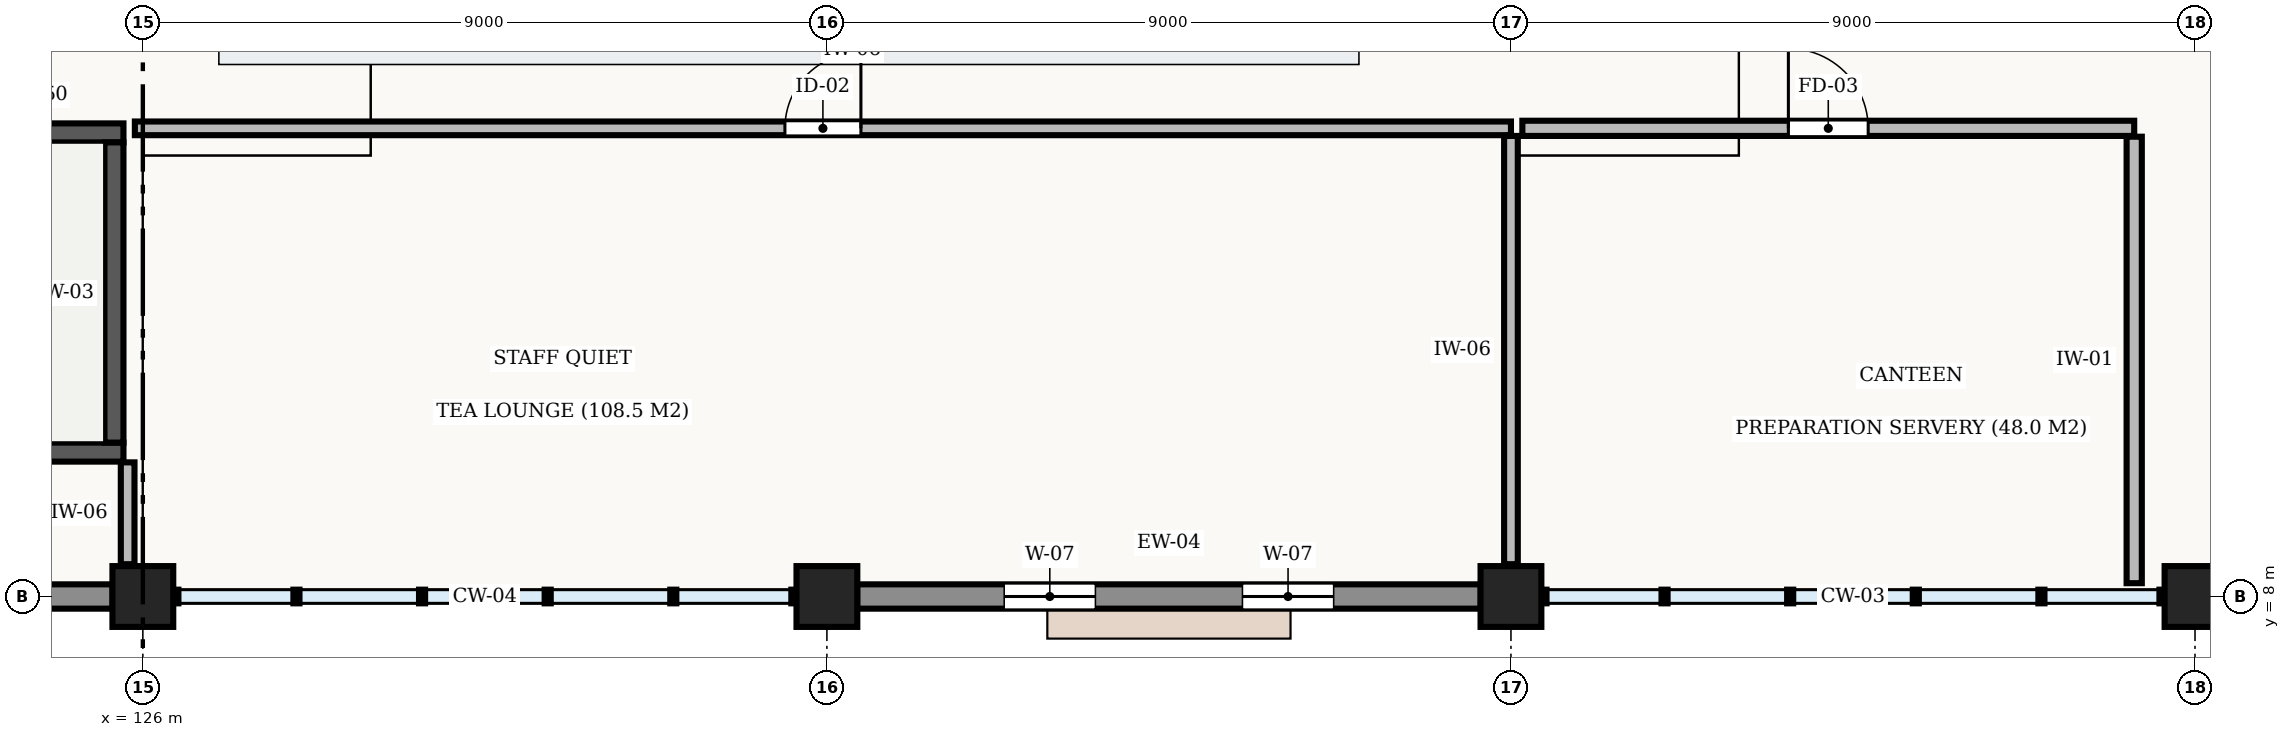
"""IFC4 building model, lengths in metres.
Left out: names, types, materials, properties, quantities, classifications, styles, units other than length and angle.
Written with IfcOpenShell. Run it as: python <this file> out.ifc"""

import sys

from ifc_helpers import new_model, si_unit, direction, frame, frame_2d, origin, origin_2d, place, context, subcontext, project, spatial, rectangle, extrude, element, fill, save


model = new_model("IFC4")
c1 = context("Model", 3, precision=1e-05, world=origin(), true_north=direction((0.0, 1.0)))
c2 = subcontext(c1, "Body", "Model", "MODEL_VIEW")
j1 = project(units=[si_unit("LENGTHUNIT", "METRE"), si_unit("PLANEANGLEUNIT", "RADIAN")], contexts=[c1])
p1 = place(None, origin())
s1 = spatial("IfcSite", under=j1, at=p1, CompositionType="ELEMENT")
p2 = place(p1, origin())
s2 = spatial("IfcBuilding", under=s1, at=p2, CompositionType="ELEMENT")
p3 = place(p2, frame((0.0, 0.0, 5.4)))
s3 = spatial("IfcBuildingStorey", under=s2, at=p3, CompositionType="ELEMENT", Elevation=5.4)
for number, where, z_axis, x_axis in (
    (1, (126.0, 8.0, 0.0), (0.0, 0.0, 1.0), (1.0, 0.0, 0.0)),
    (2, (135.0, 8.0, 0.0), (0.0, 0.0, 1.0), (1.0, 0.0, 0.0)),
    (3, (144.0, 8.0, 0.0), (0.0, 0.0, 1.0), (1.0, 0.0, 0.0)),
    (4, (153.0, 8.0, 0.0), (0.0, 0.0, 1.0), (1.0, 0.0, 0.0)),
):
    element("IfcColumn", number, at=place(p3, frame(where, z_axis=z_axis, x_axis=x_axis)), inside=s3, PredefinedType="COLUMN", context=c2, shape_type="SweptSolid", body=[
        extrude(rectangle(XDim=0.8, YDim=0.8, at=origin_2d()), origin(), (0.0, 0.0, 1.0), 4.8),
    ])
p4 = place(p3, frame((143.602, 8.0, 0.0), z_axis=(0.0, 0.0, 1.0), x_axis=(-1.0, 0.0, 0.0)))
e5 = element("IfcWall", 5, at=p4, inside=s3, PredefinedType="STANDARD", context=c2, shape_type="SweptSolid", body=[
    extrude(rectangle(XDim=8.204, YDim=0.32, at=frame_2d((4.102, 0.0))), origin(), (0.0, 0.0, 1.0), 3.86),
])
p5 = place(p4, frame((1.935, 0.0, 0.7)))
e6 = element("IfcOpeningElement", 6, at=p5, cuts=e5, PredefinedType="OPENING", context=c2, shape_type="SweptSolid", body=[
    extrude(rectangle(XDim=1.2, YDim=1.8, at=frame_2d((0.6, 0.9))), frame((0.0, 0.172, 0.0), z_axis=(0.0, -1.0, 0.0), x_axis=(1.0, 0.0, 0.0)), (0.0, 0.0, 1.0), 0.344),
])
p6 = place(p4, frame((5.069, 0.0, 0.7)))
e7 = element("IfcOpeningElement", 7, at=p6, cuts=e5, PredefinedType="OPENING", context=c2, shape_type="SweptSolid", body=[
    extrude(rectangle(XDim=1.2, YDim=1.8, at=frame_2d((0.6, 0.9))), frame((0.0, 0.172, 0.0), z_axis=(0.0, -1.0, 0.0), x_axis=(1.0, 0.0, 0.0)), (0.0, 0.0, 1.0), 0.344),
])
p7 = place(p3, frame((125.602, 8.0, 0.0), z_axis=(0.0, 0.0, 1.0), x_axis=(-1.0, 0.0, 0.0)))
e8 = element("IfcWall", 8, at=p7, inside=s3, PredefinedType="STANDARD", context=c2, shape_type="SweptSolid", body=[
    extrude(rectangle(XDim=8.204, YDim=0.32, at=frame_2d((4.102, 0.0))), origin(), (0.0, 0.0, 1.0), 3.86),
])
p8 = place(p7, frame((1.835, 0.0, 0.9)))
e9 = element("IfcOpeningElement", 9, at=p8, cuts=e8, PredefinedType="OPENING", context=c2, shape_type="SweptSolid", body=[
    extrude(rectangle(XDim=1.35, YDim=2.0, at=frame_2d((0.675, 1.0))), frame((0.0, 0.172, 0.0), z_axis=(0.0, -1.0, 0.0), x_axis=(1.0, 0.0, 0.0)), (0.0, 0.0, 1.0), 0.344),
])
p9 = place(p7, frame((5.019, 0.0, 0.9)))
e10 = element("IfcOpeningElement", 10, at=p9, cuts=e8, PredefinedType="OPENING", context=c2, shape_type="SweptSolid", body=[
    extrude(rectangle(XDim=1.35, YDim=2.0, at=frame_2d((0.675, 1.0))), frame((0.0, 0.172, 0.0), z_axis=(0.0, -1.0, 0.0), x_axis=(1.0, 0.0, 0.0)), (0.0, 0.0, 1.0), 0.344),
])
p10 = place(p3, frame((117.255, 9.9, 0.0), z_axis=(0.0, 0.0, 1.0), x_axis=(1.0, 0.0, 0.0)))
e11 = element("IfcWall", 11, at=p10, inside=s3, PredefinedType="SHEAR", context=c2, shape_type="SweptSolid", body=[
    extrude(rectangle(XDim=8.49, YDim=0.25, at=frame_2d((4.245, 0.0))), origin(), (0.0, 0.0, 1.0), 4.48),
])
p11 = place(p3, frame((125.745, 14.1, 0.0), z_axis=(0.0, 0.0, 1.0), x_axis=(-1.0, 0.0, 0.0)))
e12 = element("IfcWall", 12, at=p11, inside=s3, PredefinedType="SHEAR", context=c2, shape_type="SweptSolid", body=[
    extrude(rectangle(XDim=8.49, YDim=0.25, at=frame_2d((4.245, 0.0))), origin(), (0.0, 0.0, 1.0), 4.48),
])
p12 = place(p11, frame((6.835, 0.0, 0.0)))
e13 = element("IfcOpeningElement", 13, at=p12, cuts=e12, PredefinedType="OPENING", context=c2, shape_type="SweptSolid", body=[
    extrude(rectangle(XDim=1.25, YDim=2.15, at=frame_2d((0.625, 1.075))), frame((0.0, 0.137, 0.0), z_axis=(0.0, -1.0, 0.0), x_axis=(1.0, 0.0, 0.0)), (0.0, 0.0, 1.0), 0.274),
])
p13 = place(p3, frame((125.62, 10.025, 0.0), z_axis=(0.0, 0.0, 1.0), x_axis=(0.0, 1.0, 0.0)))
e14 = element("IfcWall", 14, at=p13, inside=s3, PredefinedType="SHEAR", context=c2, shape_type="SweptSolid", body=[
    extrude(rectangle(XDim=3.95, YDim=0.25, at=frame_2d((1.975, 0.0))), origin(), (0.0, 0.0, 1.0), 4.48),
])
p14 = place(p3, frame((125.895, 14.16, 0.0), z_axis=(0.0, 0.0, 1.0), x_axis=(1.0, 0.0, 0.0)))
e15 = element("IfcWall", 15, at=p14, inside=s3, PredefinedType="STANDARD", context=c2, shape_type="SweptSolid", body=[
    extrude(rectangle(XDim=18.105, YDim=0.18, at=frame_2d((9.052, 0.0))), origin(), (0.0, 0.0, 1.0), 4.48),
])
p15 = place(p14, frame((8.552, 0.0, 0.0)))
e16 = element("IfcOpeningElement", 16, at=p15, cuts=e15, PredefinedType="OPENING", context=c2, shape_type="SweptSolid", body=[
    extrude(rectangle(XDim=1.0, YDim=2.1, at=frame_2d((0.5, 1.05))), frame((0.0, 0.102, 0.0), z_axis=(0.0, -1.0, 0.0), x_axis=(1.0, 0.0, 0.0)), (0.0, 0.0, 1.0), 0.204),
])
p16 = place(p3, frame((125.8, 8.425, 0.0), z_axis=(0.0, 0.0, 1.0), x_axis=(0.0, 1.0, 0.0)))
e17 = element("IfcWall", 17, at=p16, inside=s3, PredefinedType="STANDARD", context=c2, shape_type="SweptSolid", body=[
    extrude(rectangle(XDim=1.34, YDim=0.18, at=frame_2d((0.67, 0.0))), origin(), (0.0, 0.0, 1.0), 3.86),
])
p17 = place(p3, frame((144.0, 8.425, 0.0), z_axis=(0.0, 0.0, 1.0), x_axis=(0.0, 1.0, 0.0)))
e18 = element("IfcWall", 18, at=p17, inside=s3, PredefinedType="STANDARD", context=c2, shape_type="SweptSolid", body=[
    extrude(rectangle(XDim=5.635, YDim=0.18, at=frame_2d((2.817, 0.0))), origin(), (0.0, 0.0, 1.0), 3.86),
])
p18 = place(p3, frame((144.15, 14.16, 0.0), z_axis=(0.0, 0.0, 1.0), x_axis=(1.0, 0.0, 0.0)))
e19 = element("IfcWall", 19, at=p18, inside=s3, PredefinedType="STANDARD", context=c2, shape_type="SweptSolid", body=[
    extrude(rectangle(XDim=8.05, YDim=0.2, at=frame_2d((4.025, 0.0))), origin(), (0.0, 0.0, 1.0), 4.48),
])
p19 = place(p18, frame((3.5, 0.0, 0.0)))
e20 = element("IfcOpeningElement", 20, at=p19, cuts=e19, PredefinedType="OPENING", context=c2, shape_type="SweptSolid", body=[
    extrude(rectangle(XDim=1.05, YDim=2.15, at=frame_2d((0.525, 1.075))), frame((0.0, 0.112, 0.0), z_axis=(0.0, -1.0, 0.0), x_axis=(1.0, 0.0, 0.0)), (0.0, 0.0, 1.0), 0.224),
])
p20 = place(p3, frame((152.2, 8.175, 0.0), z_axis=(0.0, 0.0, 1.0), x_axis=(0.0, 1.0, 0.0)))
e21 = element("IfcWall", 21, at=p20, inside=s3, PredefinedType="STANDARD", context=c2, shape_type="SweptSolid", body=[
    extrude(rectangle(XDim=5.875, YDim=0.2, at=frame_2d((2.938, 0.0))), origin(), (0.0, 0.0, 1.0), 4.48),
])
p21 = place(p5, origin())
e22 = element("IfcWindow", 22, at=p21, inside=s3, PartitioningType="SINGLE_PANEL", PredefinedType="WINDOW", context=c2, shape_type="SweptSolid", body=[
    extrude(rectangle(XDim=1.2, YDim=1.8, at=frame_2d((0.6, 0.9))), frame((0.0, 0.03, 0.0), z_axis=(0.0, -1.0, 0.0), x_axis=(1.0, 0.0, 0.0)), (0.0, 0.0, 1.0), 0.06),
])
fill(e6, e22)
p22 = place(p6, origin())
e23 = element("IfcWindow", 23, at=p22, inside=s3, PartitioningType="SINGLE_PANEL", PredefinedType="WINDOW", context=c2, shape_type="SweptSolid", body=[
    extrude(rectangle(XDim=1.2, YDim=1.8, at=frame_2d((0.6, 0.9))), frame((0.0, 0.03, 0.0), z_axis=(0.0, -1.0, 0.0), x_axis=(1.0, 0.0, 0.0)), (0.0, 0.0, 1.0), 0.06),
])
fill(e7, e23)
p23 = place(p15, origin())
e24 = element("IfcDoor", 24, at=p23, inside=s3, OperationType="SINGLE_SWING_RIGHT", PredefinedType="DOOR", context=c2, shape_type="SweptSolid", body=[
    extrude(rectangle(XDim=1.0, YDim=2.1, at=frame_2d((0.5, 1.05))), frame((0.0, 0.025, 0.0), z_axis=(0.0, -1.0, 0.0), x_axis=(1.0, 0.0, 0.0)), (0.0, 0.0, 1.0), 0.05),
])
fill(e16, e24)
p24 = place(p19, origin())
e25 = element("IfcDoor", 25, at=p24, inside=s3, OperationType="SINGLE_SWING_LEFT", PredefinedType="DOOR", context=c2, shape_type="SweptSolid", body=[
    extrude(rectangle(XDim=1.05, YDim=2.15, at=frame_2d((0.525, 1.075))), frame((0.0, 0.025, 0.0), z_axis=(0.0, -1.0, 0.0), x_axis=(1.0, 0.0, 0.0)), (0.0, 0.0, 1.0), 0.05),
])
fill(e20, e25)
save(model, sys.argv[1])
